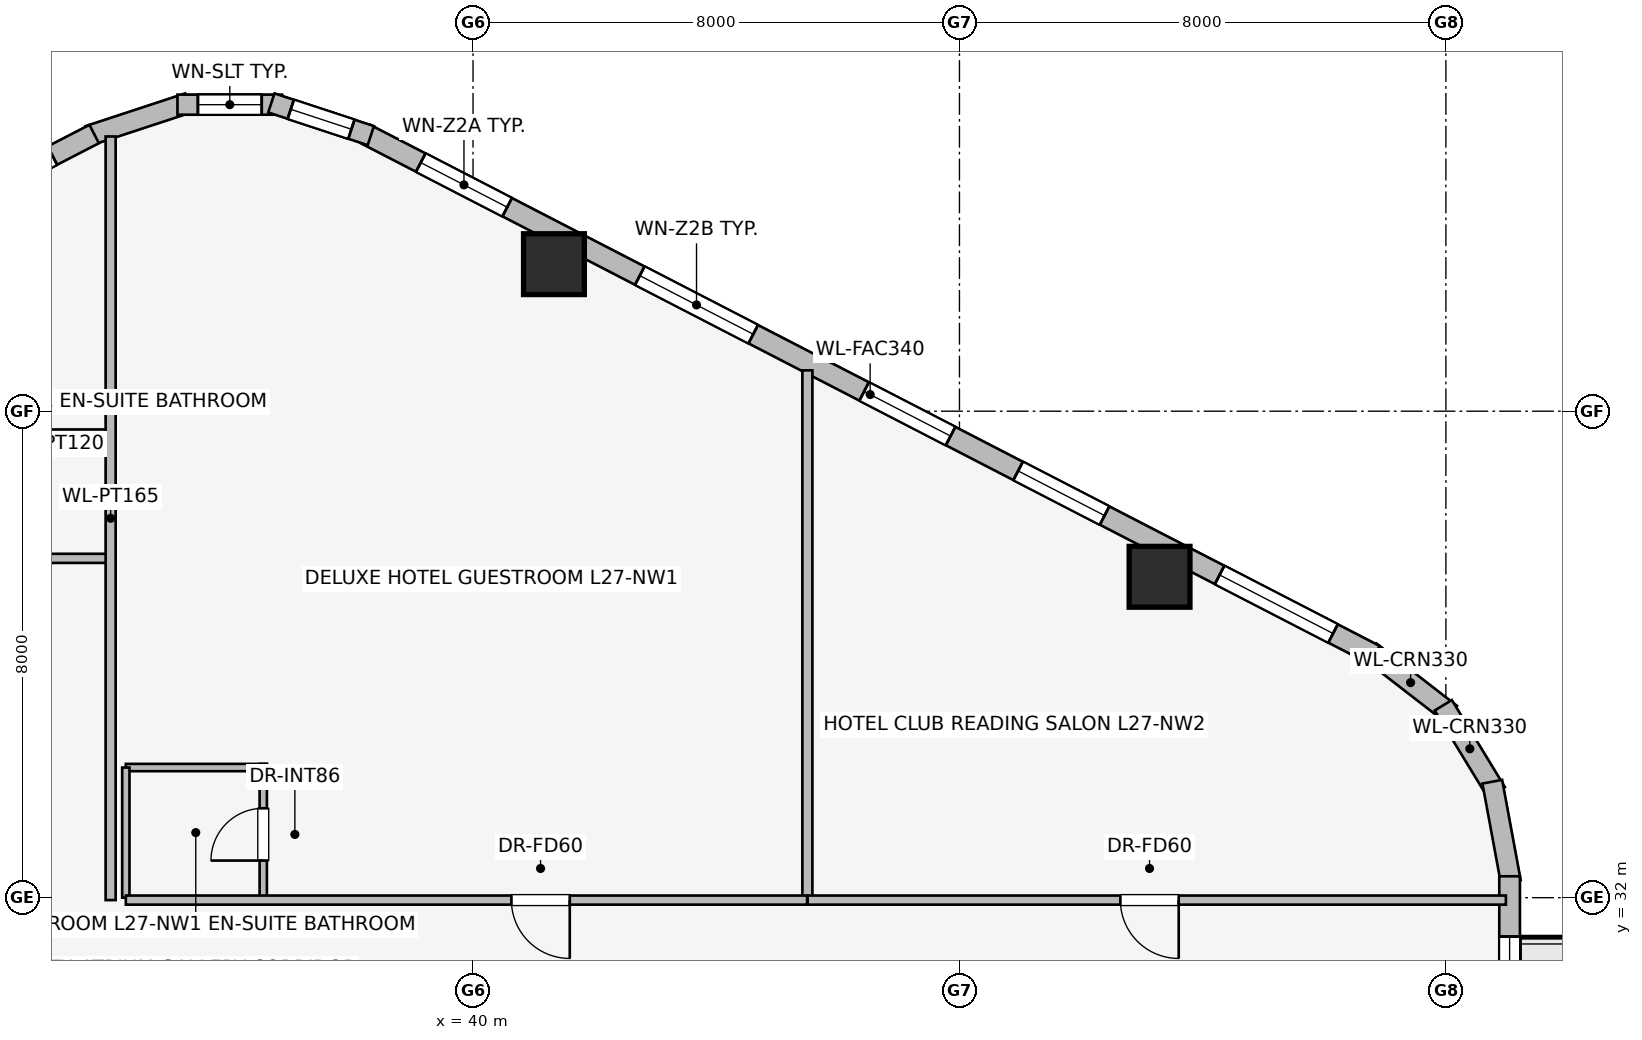
"""IFC4 building model, lengths in metres.
Left out: names, types, materials, properties, quantities, classifications, styles, units other than length and angle.
Written with IfcOpenShell. Run it as: python <this file> out.ifc"""

import sys

from ifc_helpers import new_model, si_unit, direction, frame, frame_2d, origin, origin_2d, place, context, subcontext, project, spatial, rectangle, extrude, element, fill, save


model = new_model("IFC4")
c1 = context("Model", 3, precision=1e-05, world=origin(), true_north=direction((0.0, 1.0)))
c2 = subcontext(c1, "Body", "Model", "MODEL_VIEW")
j1 = project(units=[si_unit("LENGTHUNIT", "METRE"), si_unit("PLANEANGLEUNIT", "RADIAN")], contexts=[c1])
p1 = place(None, origin())
s1 = spatial("IfcSite", under=j1, at=p1, CompositionType="ELEMENT")
p2 = place(p1, origin())
s2 = spatial("IfcBuilding", under=s1, at=p2, CompositionType="ELEMENT")
p3 = place(p2, frame((0.0, 0.0, 105.0)))
s3 = spatial("IfcBuildingStorey", under=s2, at=p3, CompositionType="ELEMENT", Elevation=105.0)
for number, where, z_axis, x_axis in (
    (1, (51.291, 37.277, 0.0), (0.0, 0.0, 1.0), (1.0, 0.0, 0.0)),
    (2, (41.331, 42.418, 0.0), (0.0, 0.0, 1.0), (1.0, 0.0, 0.0)),
):
    element("IfcColumn", number, at=place(p3, frame(where, z_axis=z_axis, x_axis=x_axis)), inside=s3, PredefinedType="COLUMN", context=c2, shape_type="SweptSolid", body=[
        extrude(rectangle(XDim=1.0, YDim=1.0, at=origin_2d()), origin(), (0.0, 0.0, 1.0), 3.45),
    ])
p4 = place(p3, frame((54.757, 36.05, 0.0), z_axis=(0.0, 0.0, 1.0), x_axis=(0.790621329885, -0.612305408053, 0.0)))
e3 = element("IfcWall", 3, at=p4, inside=s3, PredefinedType="STANDARD", context=c2, shape_type="SweptSolid", body=[
    extrude(rectangle(XDim=1.676, YDim=0.33, at=frame_2d((0.838, 0.0))), origin(), (0.0, 0.0, 1.0), 3.19),
])
p5 = place(p3, frame((55.957, 35.164, 0.0), z_axis=(0.0, 0.0, 1.0), x_axis=(0.520519429557, -0.853849824883, 0.0)))
e4 = element("IfcWall", 4, at=p5, inside=s3, PredefinedType="STANDARD", context=c2, shape_type="SweptSolid", body=[
    extrude(rectangle(XDim=1.677, YDim=0.33, at=frame_2d((0.839, 0.0))), origin(), (0.0, 0.0, 1.0), 3.19),
])
p6 = place(p3, frame((56.763, 33.907, 0.0), z_axis=(0.0, 0.0, 1.0), x_axis=(0.181984991895, -0.983301308209, 0.0)))
e5 = element("IfcWall", 5, at=p6, inside=s3, PredefinedType="STANDARD", context=c2, shape_type="SweptSolid", body=[
    extrude(rectangle(XDim=1.677, YDim=0.33, at=frame_2d((0.838, 0.0))), origin(), (0.0, 0.0, 1.0), 3.19),
])
p7 = place(p3, frame((38.231, 44.558, 0.0), z_axis=(0.0, 0.0, 1.0), x_axis=(0.888613612362, -0.458656568606, 0.0)))
e6 = element("IfcWall", 6, at=p7, inside=s3, PredefinedType="STANDARD", context=c2, shape_type="SweptSolid", body=[
    extrude(rectangle(XDim=18.681, YDim=0.34, at=frame_2d((9.34, 0.0))), origin(), (0.0, 0.0, 1.0), 3.19),
])
p8 = place(p7, frame((1.023, 0.0, 0.75)))
e7 = element("IfcOpeningElement", 7, at=p8, cuts=e6, PredefinedType="OPENING", context=c2, shape_type="SweptSolid", body=[
    extrude(rectangle(XDim=1.6, YDim=1.55, at=frame_2d((0.8, 0.775))), frame((0.0, 0.18, 0.0), z_axis=(0.0, -1.0, 0.0), x_axis=(1.0, 0.0, 0.0)), (0.0, 0.0, 1.0), 0.36),
])
p9 = place(p7, frame((5.077, 0.0, 0.75)))
e8 = element("IfcOpeningElement", 8, at=p9, cuts=e6, PredefinedType="OPENING", context=c2, shape_type="SweptSolid", body=[
    extrude(rectangle(XDim=2.1, YDim=1.5, at=frame_2d((1.05, 0.75))), frame((0.0, 0.18, 0.0), z_axis=(0.0, -1.0, 0.0), x_axis=(1.0, 0.0, 0.0)), (0.0, 0.0, 1.0), 0.36),
])
p10 = place(p7, frame((9.229, 0.0, 0.75)))
e9 = element("IfcOpeningElement", 9, at=p10, cuts=e6, PredefinedType="OPENING", context=c2, shape_type="SweptSolid", body=[
    extrude(rectangle(XDim=1.6, YDim=1.55, at=frame_2d((0.8, 0.775))), frame((0.0, 0.18, 0.0), z_axis=(0.0, -1.0, 0.0), x_axis=(1.0, 0.0, 0.0)), (0.0, 0.0, 1.0), 0.36),
])
p11 = place(p7, frame((12.079, 0.0, 0.75)))
e10 = element("IfcOpeningElement", 10, at=p11, cuts=e6, PredefinedType="OPENING", context=c2, shape_type="SweptSolid", body=[
    extrude(rectangle(XDim=1.6, YDim=1.55, at=frame_2d((0.8, 0.775))), frame((0.0, 0.18, 0.0), z_axis=(0.0, -1.0, 0.0), x_axis=(1.0, 0.0, 0.0)), (0.0, 0.0, 1.0), 0.36),
])
p12 = place(p7, frame((15.808, 0.0, 0.75)))
e11 = element("IfcOpeningElement", 11, at=p12, cuts=e6, PredefinedType="OPENING", context=c2, shape_type="SweptSolid", body=[
    extrude(rectangle(XDim=2.1, YDim=1.5, at=frame_2d((1.05, 0.75))), frame((0.0, 0.18, 0.0), z_axis=(0.0, -1.0, 0.0), x_axis=(1.0, 0.0, 0.0)), (0.0, 0.0, 1.0), 0.36),
])
p13 = place(p3, frame((33.681, 44.532, 0.0), z_axis=(0.0, 0.0, 1.0), x_axis=(0.949937416267, 0.312440242569, 0.0)))
e12 = element("IfcWall", 12, at=p13, inside=s3, PredefinedType="STANDARD", context=c2, shape_type="SweptSolid", body=[
    extrude(rectangle(XDim=1.722, YDim=0.33, at=frame_2d((0.861, 0.0))), origin(), (0.0, 0.0, 1.0), 3.19),
])
p14 = place(p3, frame((35.139, 45.041, 0.0), z_axis=(0.0, 0.0, 1.0), x_axis=(1.0, 0.0, 0.0)))
e13 = element("IfcWall", 13, at=p14, inside=s3, PredefinedType="STANDARD", context=c2, shape_type="SweptSolid", body=[
    extrude(rectangle(XDim=1.722, YDim=0.33, at=frame_2d((0.861, 0.0))), origin(), (0.0, 0.0, 1.0), 3.19),
])
p15 = place(p14, frame((0.336, 0.0, 0.75)))
e14 = element("IfcOpeningElement", 14, at=p15, cuts=e13, PredefinedType="OPENING", context=c2, shape_type="SweptSolid", body=[
    extrude(rectangle(XDim=1.05, YDim=1.4, at=frame_2d((0.525, 0.7))), frame((0.0, 0.175, 0.0), z_axis=(0.0, -1.0, 0.0), x_axis=(1.0, 0.0, 0.0)), (0.0, 0.0, 1.0), 0.35),
])
p16 = place(p3, frame((36.683, 45.07, 0.0), z_axis=(0.0, 0.0, 1.0), x_axis=(0.949937416267, -0.312440242569, 0.0)))
e15 = element("IfcWall", 15, at=p16, inside=s3, PredefinedType="STANDARD", context=c2, shape_type="SweptSolid", body=[
    extrude(rectangle(XDim=1.722, YDim=0.33, at=frame_2d((0.861, 0.0))), origin(), (0.0, 0.0, 1.0), 3.19),
])
p17 = place(p16, frame((0.336, 0.0, 0.75)))
e16 = element("IfcOpeningElement", 16, at=p17, cuts=e15, PredefinedType="OPENING", context=c2, shape_type="SweptSolid", body=[
    extrude(rectangle(XDim=1.05, YDim=1.4, at=frame_2d((0.525, 0.7))), frame((0.0, 0.175, 0.0), z_axis=(0.0, -1.0, 0.0), x_axis=(1.0, 0.0, 0.0)), (0.0, 0.0, 1.0), 0.35),
])
p18 = place(p3, frame((17.169, 35.99, 0.0), z_axis=(0.0, 0.0, 1.0), x_axis=(0.888613612362, 0.458656568606, 0.0)))
e17 = element("IfcWall", 17, at=p18, inside=s3, PredefinedType="STANDARD", context=c2, shape_type="SweptSolid", body=[
    extrude(rectangle(XDim=18.681, YDim=0.34, at=frame_2d((9.34, 0.0))), origin(), (0.0, 0.0, 1.0), 3.19),
])
p19 = place(p18, frame((8.79, 0.0, 0.0)))
e18 = element("IfcOpeningElement", 18, at=p19, cuts=e17, PredefinedType="OPENING", context=c2, shape_type="SweptSolid", body=[
    extrude(rectangle(XDim=1.1, YDim=2.04, at=frame_2d((0.55, 1.02))), frame((0.0, 0.18, 0.0), z_axis=(0.0, -1.0, 0.0), x_axis=(1.0, 0.0, 0.0)), (0.0, 0.0, 1.0), 0.36),
])
p20 = place(p18, frame((1.023, 0.0, 0.75)))
e19 = element("IfcOpeningElement", 19, at=p20, cuts=e17, PredefinedType="OPENING", context=c2, shape_type="SweptSolid", body=[
    extrude(rectangle(XDim=1.6, YDim=1.55, at=frame_2d((0.8, 0.775))), frame((0.0, 0.18, 0.0), z_axis=(0.0, -1.0, 0.0), x_axis=(1.0, 0.0, 0.0)), (0.0, 0.0, 1.0), 0.36),
])
p21 = place(p18, frame((5.373, 0.0, 0.75)))
e20 = element("IfcOpeningElement", 20, at=p21, cuts=e17, PredefinedType="OPENING", context=c2, shape_type="SweptSolid", body=[
    extrude(rectangle(XDim=2.1, YDim=1.5, at=frame_2d((1.05, 0.75))), frame((0.0, 0.18, 0.0), z_axis=(0.0, -1.0, 0.0), x_axis=(1.0, 0.0, 0.0)), (0.0, 0.0, 1.0), 0.36),
])
p22 = place(p18, frame((10.434, 0.0, 0.75)))
e21 = element("IfcOpeningElement", 21, at=p22, cuts=e17, PredefinedType="OPENING", context=c2, shape_type="SweptSolid", body=[
    extrude(rectangle(XDim=1.6, YDim=1.55, at=frame_2d((0.8, 0.775))), frame((0.0, 0.18, 0.0), z_axis=(0.0, -1.0, 0.0), x_axis=(1.0, 0.0, 0.0)), (0.0, 0.0, 1.0), 0.36),
])
p23 = place(p18, frame((12.481, 0.0, 0.75)))
e22 = element("IfcOpeningElement", 22, at=p23, cuts=e17, PredefinedType="OPENING", context=c2, shape_type="SweptSolid", body=[
    extrude(rectangle(XDim=1.6, YDim=1.55, at=frame_2d((0.8, 0.775))), frame((0.0, 0.18, 0.0), z_axis=(0.0, -1.0, 0.0), x_axis=(1.0, 0.0, 0.0)), (0.0, 0.0, 1.0), 0.36),
])
p24 = place(p18, frame((15.808, 0.0, 0.75)))
e23 = element("IfcOpeningElement", 23, at=p24, cuts=e17, PredefinedType="OPENING", context=c2, shape_type="SweptSolid", body=[
    extrude(rectangle(XDim=2.1, YDim=1.5, at=frame_2d((1.05, 0.75))), frame((0.0, 0.18, 0.0), z_axis=(0.0, -1.0, 0.0), x_axis=(1.0, 0.0, 0.0)), (0.0, 0.0, 1.0), 0.36),
])
p25 = place(p3, frame((57.048, 32.352, 0.0), z_axis=(0.0, 0.0, 1.0), x_axis=(0.0, -1.0, 0.0)))
e24 = element("IfcWall", 24, at=p25, inside=s3, PredefinedType="STANDARD", context=c2, shape_type="SweptSolid", body=[
    extrude(rectangle(XDim=7.684, YDim=0.34, at=frame_2d((3.842, 0.0))), origin(), (0.0, 0.0, 1.0), 3.19),
])
p26 = place(p25, frame((4.036, 0.0, 0.0)))
e25 = element("IfcOpeningElement", 25, at=p26, cuts=e24, PredefinedType="OPENING", context=c2, shape_type="SweptSolid", body=[
    extrude(rectangle(XDim=1.1, YDim=2.04, at=frame_2d((0.55, 1.02))), frame((0.0, 0.18, 0.0), z_axis=(0.0, -1.0, 0.0), x_axis=(1.0, 0.0, 0.0)), (0.0, 0.0, 1.0), 0.36),
])
p27 = place(p25, frame((0.992, 0.0, 0.75)))
e26 = element("IfcOpeningElement", 26, at=p27, cuts=e24, PredefinedType="OPENING", context=c2, shape_type="SweptSolid", body=[
    extrude(rectangle(XDim=1.05, YDim=1.4, at=frame_2d((0.525, 0.7))), frame((0.0, 0.18, 0.0), z_axis=(0.0, -1.0, 0.0), x_axis=(1.0, 0.0, 0.0)), (0.0, 0.0, 1.0), 0.36),
])
p28 = place(p25, frame((5.77, 0.0, 0.75)))
e27 = element("IfcOpeningElement", 27, at=p28, cuts=e24, PredefinedType="OPENING", context=c2, shape_type="SweptSolid", body=[
    extrude(rectangle(XDim=1.05, YDim=1.4, at=frame_2d((0.525, 0.7))), frame((0.0, 0.18, 0.0), z_axis=(0.0, -1.0, 0.0), x_axis=(1.0, 0.0, 0.0)), (0.0, 0.0, 1.0), 0.36),
])
p29 = place(p3, frame((34.0, 39.64, 0.0), z_axis=(0.0, 0.0, 1.0), x_axis=(-1.0, 0.0, 0.0)))
e28 = element("IfcWall", 28, at=p29, inside=s3, PredefinedType="PARTITIONING", context=c2, shape_type="SweptSolid", body=[
    extrude(rectangle(XDim=2.34, YDim=0.12, at=frame_2d((1.17, 0.0))), origin(), (0.0, 0.0, 1.0), 3.19),
])
p30 = place(p3, frame((34.0, 37.58, 0.0), z_axis=(0.0, 0.0, 1.0), x_axis=(-1.0, 0.0, 0.0)))
e29 = element("IfcWall", 29, at=p30, inside=s3, PredefinedType="PARTITIONING", context=c2, shape_type="SweptSolid", body=[
    extrude(rectangle(XDim=13.707, YDim=0.15, at=frame_2d((6.854, 0.0))), origin(), (0.0, 0.0, 1.0), 2.582),
])
p31 = place(p30, frame((4.96, 0.0, 0.0)))
e30 = element("IfcOpeningElement", 30, at=p31, cuts=e29, PredefinedType="OPENING", context=c2, shape_type="SweptSolid", body=[
    extrude(rectangle(XDim=0.96, YDim=2.0, at=frame_2d((0.48, 1.0))), frame((0.0, 0.085, 0.0), z_axis=(0.0, -1.0, 0.0), x_axis=(1.0, 0.0, 0.0)), (0.0, 0.0, 1.0), 0.17),
])
p32 = place(p3, frame((34.04, 31.96, 0.0), z_axis=(0.0, 0.0, 1.0), x_axis=(0.0, 1.0, 0.0)))
e31 = element("IfcWall", 31, at=p32, inside=s3, PredefinedType="PARTITIONING", context=c2, shape_type="SweptSolid", body=[
    extrude(rectangle(XDim=12.558, YDim=0.165, at=frame_2d((6.279, 0.0))), origin(), (0.0, 0.0, 1.0), 3.19),
])
p33 = place(p3, frame((45.499, 31.97, 0.0), z_axis=(0.0, 0.0, 1.0), x_axis=(0.0, 1.0, 0.0)))
e32 = element("IfcWall", 32, at=p33, inside=s3, PredefinedType="PARTITIONING", context=c2, shape_type="SweptSolid", body=[
    extrude(rectangle(XDim=8.702, YDim=0.165, at=frame_2d((4.351, 0.0))), origin(), (0.0, 0.0, 1.0), 3.19),
])
p34 = place(p3, frame((36.55, 31.96, 0.0), z_axis=(0.0, 0.0, 1.0), x_axis=(0.0, 1.0, 0.0)))
e33 = element("IfcWall", 33, at=p34, inside=s3, PredefinedType="PARTITIONING", context=c2, shape_type="SweptSolid", body=[
    extrude(rectangle(XDim=2.24, YDim=0.12, at=frame_2d((1.12, 0.0))), origin(), (0.0, 0.0, 1.0), 3.19),
])
p35 = place(p34, frame((0.65, 0.0, 0.0)))
e34 = element("IfcOpeningElement", 34, at=p35, cuts=e33, PredefinedType="OPENING", context=c2, shape_type="SweptSolid", body=[
    extrude(rectangle(XDim=0.86, YDim=2.0, at=frame_2d((0.43, 1.0))), frame((0.0, 0.07, 0.0), z_axis=(0.0, -1.0, 0.0), x_axis=(1.0, 0.0, 0.0)), (0.0, 0.0, 1.0), 0.14),
])
p36 = place(p3, frame((36.61, 34.14, 0.0), z_axis=(0.0, 0.0, 1.0), x_axis=(-1.0, 0.0, 0.0)))
e35 = element("IfcWall", 35, at=p36, inside=s3, PredefinedType="PARTITIONING", context=c2, shape_type="SweptSolid", body=[
    extrude(rectangle(XDim=2.32, YDim=0.12, at=frame_2d((1.16, 0.0))), origin(), (0.0, 0.0, 1.0), 3.19),
])
p37 = place(p3, frame((34.29, 34.14, 0.0), z_axis=(0.0, 0.0, 1.0), x_axis=(0.0, -1.0, 0.0)))
e36 = element("IfcWall", 36, at=p37, inside=s3, PredefinedType="PARTITIONING", context=c2, shape_type="SweptSolid", body=[
    extrude(rectangle(XDim=2.14, YDim=0.12, at=frame_2d((1.07, 0.0))), origin(), (0.0, 0.0, 1.0), 3.19),
])
p38 = place(p3, frame((45.494, 31.96, 0.0), z_axis=(0.0, 0.0, 1.0), x_axis=(-1.0, 0.0, 0.0)))
e37 = element("IfcWall", 37, at=p38, inside=s3, PredefinedType="PARTITIONING", context=c2, shape_type="SweptSolid", body=[
    extrude(rectangle(XDim=11.204, YDim=0.15, at=frame_2d((5.602, 0.0))), origin(), (0.0, 0.0, 1.0), 3.19),
])
p39 = place(p38, frame((3.903, 0.0, 0.0)))
e38 = element("IfcOpeningElement", 38, at=p39, cuts=e37, PredefinedType="OPENING", context=c2, shape_type="SweptSolid", body=[
    extrude(rectangle(XDim=0.96, YDim=2.0, at=frame_2d((0.48, 1.0))), frame((0.0, 0.085, 0.0), z_axis=(0.0, -1.0, 0.0), x_axis=(1.0, 0.0, 0.0)), (0.0, 0.0, 1.0), 0.17),
])
p40 = place(p3, frame((56.987, 31.96, 0.0), z_axis=(0.0, 0.0, 1.0), x_axis=(-1.0, 0.0, 0.0)))
e39 = element("IfcWall", 39, at=p40, inside=s3, PredefinedType="PARTITIONING", context=c2, shape_type="SweptSolid", body=[
    extrude(rectangle(XDim=11.483, YDim=0.15, at=frame_2d((5.742, 0.0))), origin(), (0.0, 0.0, 1.0), 3.19),
])
p41 = place(p40, frame((5.381, 0.0, 0.0)))
e40 = element("IfcOpeningElement", 40, at=p41, cuts=e39, PredefinedType="OPENING", context=c2, shape_type="SweptSolid", body=[
    extrude(rectangle(XDim=0.96, YDim=2.0, at=frame_2d((0.48, 1.0))), frame((0.0, 0.085, 0.0), z_axis=(0.0, -1.0, 0.0), x_axis=(1.0, 0.0, 0.0)), (0.0, 0.0, 1.0), 0.17),
])
p42 = place(p8, origin())
e41 = element("IfcWindow", 41, at=p42, inside=s3, PartitioningType="SINGLE_PANEL", PredefinedType="WINDOW", context=c2, shape_type="SweptSolid", body=[
    extrude(rectangle(XDim=1.6, YDim=1.55, at=frame_2d((0.8, 0.775))), frame((0.0, 0.03, 0.0), z_axis=(0.0, -1.0, 0.0), x_axis=(1.0, 0.0, 0.0)), (0.0, 0.0, 1.0), 0.06),
])
fill(e7, e41)
p43 = place(p9, origin())
e42 = element("IfcWindow", 42, at=p43, inside=s3, PartitioningType="SINGLE_PANEL", PredefinedType="WINDOW", context=c2, shape_type="SweptSolid", body=[
    extrude(rectangle(XDim=2.1, YDim=1.5, at=frame_2d((1.05, 0.75))), frame((0.0, 0.03, 0.0), z_axis=(0.0, -1.0, 0.0), x_axis=(1.0, 0.0, 0.0)), (0.0, 0.0, 1.0), 0.06),
])
fill(e8, e42)
p44 = place(p10, origin())
e43 = element("IfcWindow", 43, at=p44, inside=s3, PartitioningType="SINGLE_PANEL", PredefinedType="WINDOW", context=c2, shape_type="SweptSolid", body=[
    extrude(rectangle(XDim=1.6, YDim=1.55, at=frame_2d((0.8, 0.775))), frame((0.0, 0.03, 0.0), z_axis=(0.0, -1.0, 0.0), x_axis=(1.0, 0.0, 0.0)), (0.0, 0.0, 1.0), 0.06),
])
fill(e9, e43)
p45 = place(p11, origin())
e44 = element("IfcWindow", 44, at=p45, inside=s3, PartitioningType="SINGLE_PANEL", PredefinedType="WINDOW", context=c2, shape_type="SweptSolid", body=[
    extrude(rectangle(XDim=1.6, YDim=1.55, at=frame_2d((0.8, 0.775))), frame((0.0, 0.03, 0.0), z_axis=(0.0, -1.0, 0.0), x_axis=(1.0, 0.0, 0.0)), (0.0, 0.0, 1.0), 0.06),
])
fill(e10, e44)
p46 = place(p12, origin())
e45 = element("IfcWindow", 45, at=p46, inside=s3, PartitioningType="SINGLE_PANEL", PredefinedType="WINDOW", context=c2, shape_type="SweptSolid", body=[
    extrude(rectangle(XDim=2.1, YDim=1.5, at=frame_2d((1.05, 0.75))), frame((0.0, 0.03, 0.0), z_axis=(0.0, -1.0, 0.0), x_axis=(1.0, 0.0, 0.0)), (0.0, 0.0, 1.0), 0.06),
])
fill(e11, e45)
p47 = place(p15, origin())
e46 = element("IfcWindow", 46, at=p47, inside=s3, PartitioningType="SINGLE_PANEL", PredefinedType="WINDOW", context=c2, shape_type="SweptSolid", body=[
    extrude(rectangle(XDim=1.05, YDim=1.4, at=frame_2d((0.525, 0.7))), frame((0.0, 0.03, 0.0), z_axis=(0.0, -1.0, 0.0), x_axis=(1.0, 0.0, 0.0)), (0.0, 0.0, 1.0), 0.06),
])
fill(e14, e46)
p48 = place(p17, origin())
e47 = element("IfcWindow", 47, at=p48, inside=s3, PartitioningType="SINGLE_PANEL", PredefinedType="WINDOW", context=c2, shape_type="SweptSolid", body=[
    extrude(rectangle(XDim=1.05, YDim=1.4, at=frame_2d((0.525, 0.7))), frame((0.0, 0.03, 0.0), z_axis=(0.0, -1.0, 0.0), x_axis=(1.0, 0.0, 0.0)), (0.0, 0.0, 1.0), 0.06),
])
fill(e16, e47)
p49 = place(p24, origin())
e48 = element("IfcWindow", 48, at=p49, inside=s3, PartitioningType="SINGLE_PANEL", PredefinedType="WINDOW", context=c2, shape_type="SweptSolid", body=[
    extrude(rectangle(XDim=2.1, YDim=1.5, at=frame_2d((1.05, 0.75))), frame((0.0, 0.03, 0.0), z_axis=(0.0, -1.0, 0.0), x_axis=(1.0, 0.0, 0.0)), (0.0, 0.0, 1.0), 0.06),
])
fill(e23, e48)
p50 = place(p27, origin())
e49 = element("IfcWindow", 49, at=p50, inside=s3, PartitioningType="SINGLE_PANEL", PredefinedType="WINDOW", context=c2, shape_type="SweptSolid", body=[
    extrude(rectangle(XDim=1.05, YDim=1.4, at=frame_2d((0.525, 0.7))), frame((0.0, 0.03, 0.0), z_axis=(0.0, -1.0, 0.0), x_axis=(1.0, 0.0, 0.0)), (0.0, 0.0, 1.0), 0.06),
])
fill(e26, e49)
p51 = place(p35, origin())
e50 = element("IfcDoor", 50, at=p51, inside=s3, OperationType="SINGLE_SWING_LEFT", PredefinedType="DOOR", context=c2, shape_type="SweptSolid", body=[
    extrude(rectangle(XDim=0.86, YDim=2.0, at=frame_2d((0.43, 1.0))), frame((0.0, 0.025, 0.0), z_axis=(0.0, -1.0, 0.0), x_axis=(1.0, 0.0, 0.0)), (0.0, 0.0, 1.0), 0.05),
])
fill(e34, e50)
p52 = place(p39, origin())
e51 = element("IfcDoor", 51, at=p52, inside=s3, OperationType="SINGLE_SWING_LEFT", PredefinedType="DOOR", context=c2, shape_type="SweptSolid", body=[
    extrude(rectangle(XDim=0.96, YDim=2.0, at=frame_2d((0.48, 1.0))), frame((0.0, 0.025, 0.0), z_axis=(0.0, -1.0, 0.0), x_axis=(1.0, 0.0, 0.0)), (0.0, 0.0, 1.0), 0.05),
])
fill(e38, e51)
p53 = place(p41, origin())
e52 = element("IfcDoor", 52, at=p53, inside=s3, OperationType="SINGLE_SWING_LEFT", PredefinedType="DOOR", context=c2, shape_type="SweptSolid", body=[
    extrude(rectangle(XDim=0.96, YDim=2.0, at=frame_2d((0.48, 1.0))), frame((0.0, 0.025, 0.0), z_axis=(0.0, -1.0, 0.0), x_axis=(1.0, 0.0, 0.0)), (0.0, 0.0, 1.0), 0.05),
])
fill(e40, e52)
save(model, sys.argv[1])
